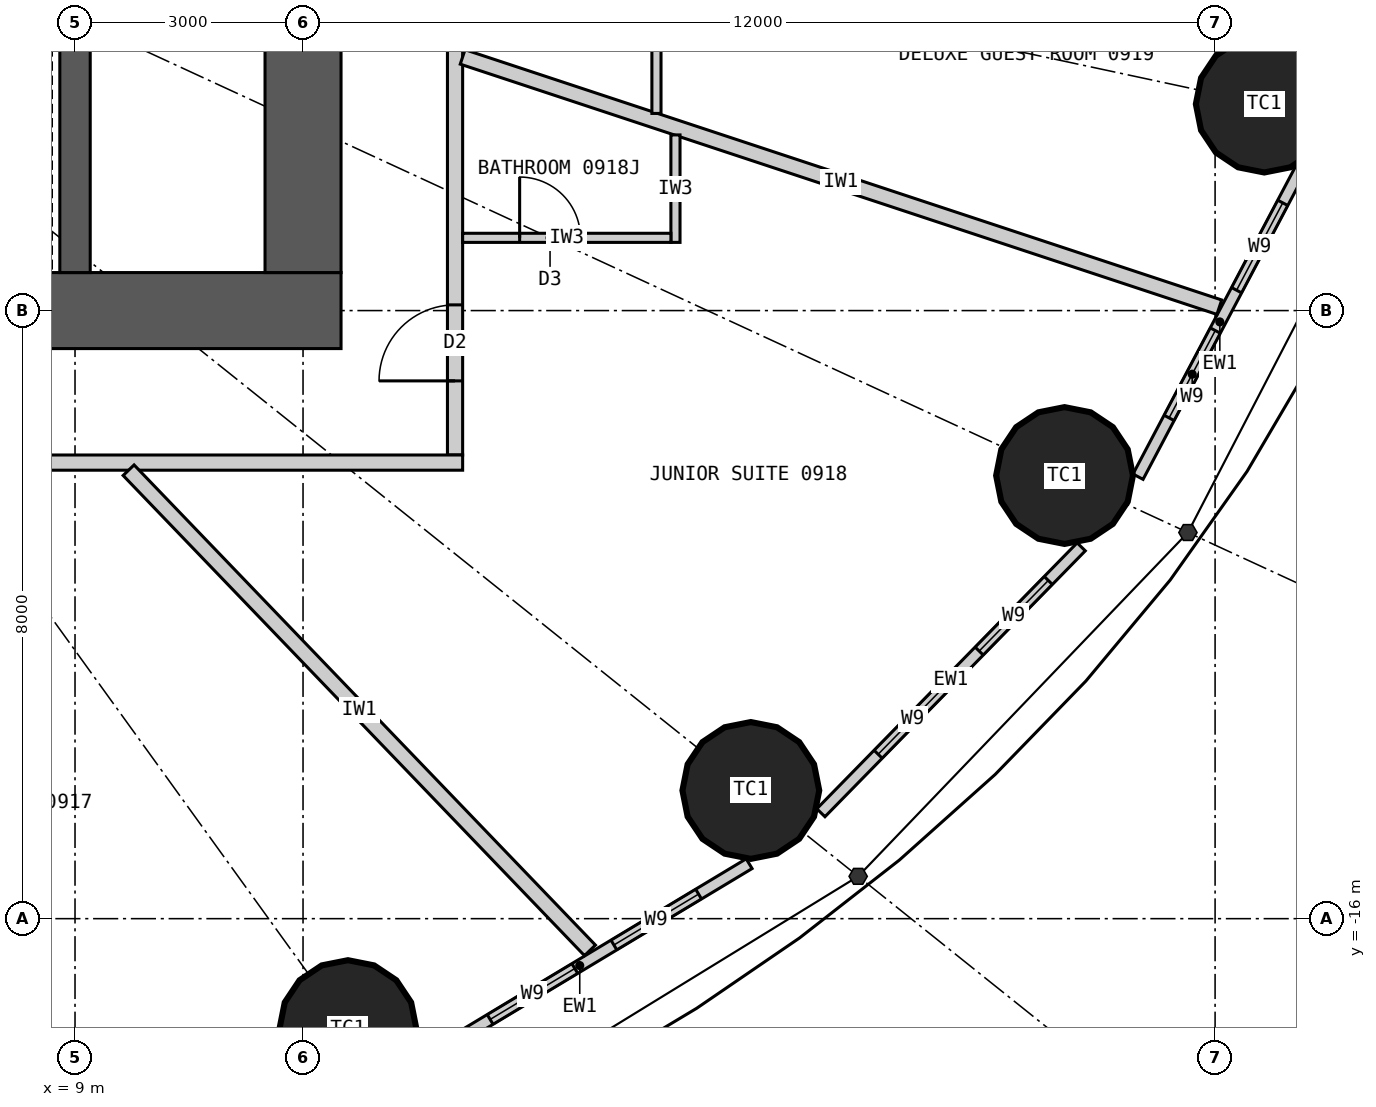
"""IFC4 building model, lengths in metres.
Left out: names, types, materials, properties, quantities, classifications, styles, units other than length and angle.
Written with IfcOpenShell. Run it as: python <this file> out.ifc"""

import sys

from ifc_helpers import new_model, si_unit, direction, frame, frame_2d, origin, origin_2d, place, context, subcontext, project, spatial, rectangle, circle, extrude, element, fill, save


model = new_model("IFC4")
c1 = context("Model", 3, precision=1e-05, world=origin(), true_north=direction((0.0, 1.0)))
c2 = subcontext(c1, "Body", "Model", "MODEL_VIEW")
j1 = project(units=[si_unit("LENGTHUNIT", "METRE"), si_unit("PLANEANGLEUNIT", "RADIAN")], contexts=[c1])
p1 = place(None, origin())
s1 = spatial("IfcSite", under=j1, at=p1, CompositionType="ELEMENT")
p2 = place(p1, origin())
s2 = spatial("IfcBuilding", under=s1, at=p2, CompositionType="ELEMENT")
p3 = place(p2, frame((0.0, 0.0, 42.6)))
s3 = spatial("IfcBuildingStorey", under=s2, at=p3, CompositionType="ELEMENT", Elevation=42.6)
for number, where, z_axis, x_axis in (
    (1, (12.591, -17.447, 0.0), (0.0, 0.0, 1.0), (1.0, 0.0, 0.0)),
    (2, (17.892, -14.313, 0.0), (0.0, 0.0, 1.0), (1.0, 0.0, 0.0)),
    (3, (22.019, -10.17, 0.0), (0.0, 0.0, 1.0), (1.0, 0.0, 0.0)),
    (4, (24.647, -5.283, 0.0), (0.0, 0.0, 1.0), (1.0, 0.0, 0.0)),
):
    element("IfcColumn", number, at=place(p3, frame(where, z_axis=z_axis, x_axis=x_axis)), inside=s3, PredefinedType="COLUMN", context=c2, shape_type="SweptSolid", body=[
        extrude(circle(Radius=0.9, at=origin_2d()), origin(), (0.0, 0.0, 1.0), 3.3),
    ])
p4 = place(p3, frame((12.5, -8.0, 0.0), z_axis=(0.0, 0.0, 1.0), x_axis=(-1.0, 0.0, 0.0)))
e5 = element("IfcWall", 5, at=p4, inside=s3, PredefinedType="SHEAR", context=c2, shape_type="SweptSolid", body=[
    extrude(rectangle(XDim=25.0, YDim=1.0, at=frame_2d((12.5, 0.0))), origin(), (0.0, 0.0, 1.0), 3.3),
])
p5 = place(p4, frame((11.2, 0.0, 0.0)))
e6 = element("IfcOpeningElement", 6, at=p5, cuts=e5, PredefinedType="OPENING", context=c2, shape_type="SweptSolid", body=[
    extrude(rectangle(XDim=1.2, YDim=2.2, at=frame_2d((0.6, 1.1))), frame((0.0, 0.51, 0.0), z_axis=(0.0, -1.0, 0.0), x_axis=(1.0, 0.0, 0.0)), (0.0, 0.0, 1.0), 1.02),
])
p6 = place(p4, frame((18.8, 0.0, 0.0)))
e7 = element("IfcOpeningElement", 7, at=p6, cuts=e5, PredefinedType="OPENING", context=c2, shape_type="SweptSolid", body=[
    extrude(rectangle(XDim=0.9, YDim=2.2, at=frame_2d((0.45, 1.1))), frame((0.0, 0.51, 0.0), z_axis=(0.0, -1.0, 0.0), x_axis=(1.0, 0.0, 0.0)), (0.0, 0.0, 1.0), 1.02),
])
p7 = place(p3, frame((12.0, -7.5, 0.0), z_axis=(0.0, 0.0, 1.0), x_axis=(0.0, 1.0, 0.0)))
e8 = element("IfcWall", 8, at=p7, inside=s3, PredefinedType="SHEAR", context=c2, shape_type="SweptSolid", body=[
    extrude(rectangle(XDim=15.0, YDim=1.0, at=frame_2d((7.5, 0.0))), origin(), (0.0, 0.0, 1.0), 3.3),
])
p8 = place(p7, frame((6.6, 0.0, 0.0)))
e9 = element("IfcOpeningElement", 9, at=p8, cuts=e8, PredefinedType="OPENING", context=c2, shape_type="SweptSolid", body=[
    extrude(rectangle(XDim=1.8, YDim=2.2, at=frame_2d((0.9, 1.1))), frame((0.0, 0.51, 0.0), z_axis=(0.0, -1.0, 0.0), x_axis=(1.0, 0.0, 0.0)), (0.0, 0.0, 1.0), 1.02),
])
p9 = place(p3, frame((9.0, -7.5, 0.0), z_axis=(0.0, 0.0, 1.0), x_axis=(0.0, 1.0, 0.0)))
e10 = element("IfcWall", 10, at=p9, inside=s3, PredefinedType="SHEAR", context=c2, shape_type="SweptSolid", body=[
    extrude(rectangle(XDim=3.0, YDim=0.4, at=frame_2d((1.5, 0.0))), origin(), (0.0, 0.0, 1.0), 3.3),
])
p10 = place(p3, frame((13.412, -17.957, 0.0), z_axis=(0.0, 0.0, 1.0), x_axis=(0.856958191554, 0.515385931054, 0.0)))
e11 = element("IfcWall", 11, at=p10, inside=s3, PredefinedType="ELEMENTEDWALL", context=c2, shape_type="SweptSolid", body=[
    extrude(rectangle(XDim=5.201, YDim=0.15, at=frame_2d((2.601, 0.0))), origin(), (0.0, 0.0, 1.0), 3.05),
])
p11 = place(p10, frame((1.225, 0.0, 0.9)))
e12 = element("IfcOpeningElement", 12, at=p11, cuts=e11, PredefinedType="OPENING", context=c2, shape_type="SweptSolid", body=[
    extrude(rectangle(XDim=1.3, YDim=1.9, at=frame_2d((0.65, 0.95))), frame((0.0, 0.085, 0.0), z_axis=(0.0, -1.0, 0.0), x_axis=(1.0, 0.0, 0.0)), (0.0, 0.0, 1.0), 0.17),
])
p12 = place(p10, frame((3.125, 0.0, 0.9)))
e13 = element("IfcOpeningElement", 13, at=p12, cuts=e11, PredefinedType="OPENING", context=c2, shape_type="SweptSolid", body=[
    extrude(rectangle(XDim=1.3, YDim=1.9, at=frame_2d((0.65, 0.95))), frame((0.0, 0.085, 0.0), z_axis=(0.0, -1.0, 0.0), x_axis=(1.0, 0.0, 0.0)), (0.0, 0.0, 1.0), 0.17),
])
p13 = place(p3, frame((18.813, -14.607, 0.0), z_axis=(0.0, 0.0, 1.0), x_axis=(0.699612594083, 0.714522370679, 0.0)))
e14 = element("IfcWall", 14, at=p13, inside=s3, PredefinedType="ELEMENTEDWALL", context=c2, shape_type="SweptSolid", body=[
    extrude(rectangle(XDim=4.896, YDim=0.15, at=frame_2d((2.448, 0.0))), origin(), (0.0, 0.0, 1.0), 3.05),
])
p14 = place(p13, frame((1.077, 0.0, 0.9)))
e15 = element("IfcOpeningElement", 15, at=p14, cuts=e14, PredefinedType="OPENING", context=c2, shape_type="SweptSolid", body=[
    extrude(rectangle(XDim=1.3, YDim=1.9, at=frame_2d((0.65, 0.95))), frame((0.0, 0.085, 0.0), z_axis=(0.0, -1.0, 0.0), x_axis=(1.0, 0.0, 0.0)), (0.0, 0.0, 1.0), 0.17),
])
p15 = place(p13, frame((2.977, 0.0, 0.9)))
e16 = element("IfcOpeningElement", 16, at=p15, cuts=e14, PredefinedType="OPENING", context=c2, shape_type="SweptSolid", body=[
    extrude(rectangle(XDim=1.3, YDim=1.9, at=frame_2d((0.65, 0.95))), frame((0.0, 0.085, 0.0), z_axis=(0.0, -1.0, 0.0), x_axis=(1.0, 0.0, 0.0)), (0.0, 0.0, 1.0), 0.17),
])
p16 = place(p3, frame((22.986, -10.185, 0.0), z_axis=(0.0, 0.0, 1.0), x_axis=(0.467303182954, 0.884097129959, 0.0)))
e17 = element("IfcWall", 17, at=p16, inside=s3, PredefinedType="ELEMENTEDWALL", context=c2, shape_type="SweptSolid", body=[
    extrude(rectangle(XDim=4.606, YDim=0.15, at=frame_2d((2.303, 0.0))), origin(), (0.0, 0.0, 1.0), 3.05),
])
p17 = place(p16, frame((0.875, 0.0, 0.9)))
e18 = element("IfcOpeningElement", 18, at=p17, cuts=e17, PredefinedType="OPENING", context=c2, shape_type="SweptSolid", body=[
    extrude(rectangle(XDim=1.3, YDim=1.9, at=frame_2d((0.65, 0.95))), frame((0.0, 0.085, 0.0), z_axis=(0.0, -1.0, 0.0), x_axis=(1.0, 0.0, 0.0)), (0.0, 0.0, 1.0), 0.17),
])
p18 = place(p16, frame((2.775, 0.0, 0.9)))
e19 = element("IfcOpeningElement", 19, at=p18, cuts=e17, PredefinedType="OPENING", context=c2, shape_type="SweptSolid", body=[
    extrude(rectangle(XDim=1.3, YDim=1.9, at=frame_2d((0.65, 0.95))), frame((0.0, 0.085, 0.0), z_axis=(0.0, -1.0, 0.0), x_axis=(1.0, 0.0, 0.0)), (0.0, 0.0, 1.0), 0.17),
])
p19 = place(p3, frame((14.0, -9.9, 0.0), z_axis=(0.0, 0.0, 1.0), x_axis=(0.0, 1.0, 0.0)))
e20 = element("IfcWall", 20, at=p19, inside=s3, PredefinedType="PARTITIONING", context=c2, shape_type="SweptSolid", body=[
    extrude(rectangle(XDim=19.8, YDim=0.2, at=frame_2d((9.9, 0.0))), origin(), (0.0, 0.0, 1.0), 3.05),
])
p20 = place(p19, frame((11.698, 0.0, 0.0)))
e21 = element("IfcOpeningElement", 21, at=p20, cuts=e20, PredefinedType="OPENING", context=c2, shape_type="SweptSolid", body=[
    extrude(rectangle(XDim=1.0, YDim=2.2, at=frame_2d((0.5, 1.1))), frame((0.0, 0.11, 0.0), z_axis=(0.0, -1.0, 0.0), x_axis=(1.0, 0.0, 0.0)), (0.0, 0.0, 1.0), 0.22),
])
p21 = place(p19, frame((13.554, 0.0, 0.0)))
e22 = element("IfcOpeningElement", 22, at=p21, cuts=e20, PredefinedType="OPENING", context=c2, shape_type="SweptSolid", body=[
    extrude(rectangle(XDim=1.0, YDim=2.0, at=frame_2d((0.5, 1.0))), frame((0.0, 0.11, 0.0), z_axis=(0.0, -1.0, 0.0), x_axis=(1.0, 0.0, 0.0)), (0.0, 0.0, 1.0), 0.22),
])
p22 = place(p19, frame((18.698, 0.0, 0.0)))
e23 = element("IfcOpeningElement", 23, at=p22, cuts=e20, PredefinedType="OPENING", context=c2, shape_type="SweptSolid", body=[
    extrude(rectangle(XDim=1.0, YDim=2.2, at=frame_2d((0.5, 1.1))), frame((0.0, 0.11, 0.0), z_axis=(0.0, -1.0, 0.0), x_axis=(1.0, 0.0, 0.0)), (0.0, 0.0, 1.0), 0.22),
])
p23 = place(p19, frame((0.975, 0.0, 0.0)))
e24 = element("IfcOpeningElement", 24, at=p23, cuts=e20, PredefinedType="OPENING", context=c2, shape_type="SweptSolid", body=[
    extrude(rectangle(XDim=1.0, YDim=2.2, at=frame_2d((0.5, 1.1))), frame((0.0, 0.11, 0.0), z_axis=(0.0, -1.0, 0.0), x_axis=(1.0, 0.0, 0.0)), (0.0, 0.0, 1.0), 0.22),
])
p24 = place(p19, frame((7.097, 0.0, 0.0)))
e25 = element("IfcOpeningElement", 25, at=p24, cuts=e20, PredefinedType="OPENING", context=c2, shape_type="SweptSolid", body=[
    extrude(rectangle(XDim=1.0, YDim=2.2, at=frame_2d((0.5, 1.1))), frame((0.0, 0.11, 0.0), z_axis=(0.0, -1.0, 0.0), x_axis=(1.0, 0.0, 0.0)), (0.0, 0.0, 1.0), 0.22),
])
p25 = place(p3, frame((14.1, -10.0, 0.0), z_axis=(0.0, 0.0, 1.0), x_axis=(-1.0, 0.0, 0.0)))
e26 = element("IfcWall", 26, at=p25, inside=s3, PredefinedType="PARTITIONING", context=c2, shape_type="SweptSolid", body=[
    extrude(rectangle(XDim=28.2, YDim=0.2, at=frame_2d((14.1, 0.0))), origin(), (0.0, 0.0, 1.0), 3.05),
])
p26 = place(p25, frame((21.948, 0.0, 0.0)))
e27 = element("IfcOpeningElement", 27, at=p26, cuts=e26, PredefinedType="OPENING", context=c2, shape_type="SweptSolid", body=[
    extrude(rectangle(XDim=1.0, YDim=2.2, at=frame_2d((0.5, 1.1))), frame((0.0, 0.11, 0.0), z_axis=(0.0, -1.0, 0.0), x_axis=(1.0, 0.0, 0.0)), (0.0, 0.0, 1.0), 0.22),
])
p27 = place(p25, frame((15.684, 0.0, 0.0)))
e28 = element("IfcOpeningElement", 28, at=p27, cuts=e26, PredefinedType="OPENING", context=c2, shape_type="SweptSolid", body=[
    extrude(rectangle(XDim=1.0, YDim=2.2, at=frame_2d((0.5, 1.1))), frame((0.0, 0.11, 0.0), z_axis=(0.0, -1.0, 0.0), x_axis=(1.0, 0.0, 0.0)), (0.0, 0.0, 1.0), 0.22),
])
p28 = place(p25, frame((8.875, 0.0, 0.0)))
e29 = element("IfcOpeningElement", 29, at=p28, cuts=e26, PredefinedType="OPENING", context=c2, shape_type="SweptSolid", body=[
    extrude(rectangle(XDim=1.0, YDim=2.2, at=frame_2d((0.5, 1.1))), frame((0.0, 0.11, 0.0), z_axis=(0.0, -1.0, 0.0), x_axis=(1.0, 0.0, 0.0)), (0.0, 0.0, 1.0), 0.22),
])
p29 = place(p3, frame((9.705, -10.1, 0.0), z_axis=(0.0, 0.0, 1.0), x_axis=(0.692879226267, -0.721053658064, 0.0)))
e30 = element("IfcWall", 30, at=p29, inside=s3, PredefinedType="PARTITIONING", context=c2, shape_type="SweptSolid", body=[
    extrude(rectangle(XDim=8.761, YDim=0.2, at=frame_2d((4.38, 0.0))), origin(), (0.0, 0.0, 1.0), 3.05),
])
p30 = place(p3, frame((14.1, -4.663, 0.0), z_axis=(0.0, 0.0, 1.0), x_axis=(0.949432655039, -0.31397075269, 0.0)))
e31 = element("IfcWall", 31, at=p30, inside=s3, PredefinedType="PARTITIONING", context=c2, shape_type="SweptSolid", body=[
    extrude(rectangle(XDim=10.486, YDim=0.2, at=frame_2d((5.243, 0.0))), origin(), (0.0, 0.0, 1.0), 3.05),
])
p31 = place(p3, frame((16.9, -5.689, 0.0), z_axis=(0.0, 0.0, 1.0), x_axis=(0.0, -1.0, 0.0)))
e32 = element("IfcWall", 32, at=p31, inside=s3, PredefinedType="PARTITIONING", context=c2, shape_type="SweptSolid", body=[
    extrude(rectangle(XDim=1.414, YDim=0.12, at=frame_2d((0.707, 0.0))), origin(), (0.0, 0.0, 1.0), 3.05),
])
p32 = place(p3, frame((14.1, -7.043, 0.0), z_axis=(0.0, 0.0, 1.0), x_axis=(1.0, 0.0, 0.0)))
e33 = element("IfcWall", 33, at=p32, inside=s3, PredefinedType="PARTITIONING", context=c2, shape_type="SweptSolid", body=[
    extrude(rectangle(XDim=2.74, YDim=0.12, at=frame_2d((1.37, 0.0))), origin(), (0.0, 0.0, 1.0), 3.05),
])
p33 = place(p32, frame((0.75, 0.0, 0.0)))
e34 = element("IfcOpeningElement", 34, at=p33, cuts=e33, PredefinedType="OPENING", context=c2, shape_type="SweptSolid", body=[
    extrude(rectangle(XDim=0.8, YDim=2.1, at=frame_2d((0.4, 1.05))), frame((0.0, 0.07, 0.0), z_axis=(0.0, -1.0, 0.0), x_axis=(1.0, 0.0, 0.0)), (0.0, 0.0, 1.0), 0.14),
])
p34 = place(p3, frame((16.65, -5.406, 0.0), z_axis=(0.0, 0.0, 1.0), x_axis=(0.0, 1.0, 0.0)))
e35 = element("IfcWall", 35, at=p34, inside=s3, PredefinedType="PARTITIONING", context=c2, shape_type="SweptSolid", body=[
    extrude(rectangle(XDim=2.483, YDim=0.12, at=frame_2d((1.242, 0.0))), origin(), (0.0, 0.0, 1.0), 3.05),
])
p35 = place(p11, origin())
e36 = element("IfcWindow", 36, at=p35, inside=s3, PartitioningType="SINGLE_PANEL", PredefinedType="WINDOW", context=c2, shape_type="SweptSolid", body=[
    extrude(rectangle(XDim=1.3, YDim=1.9, at=frame_2d((0.65, 0.95))), frame((0.0, 0.03, 0.0), z_axis=(0.0, -1.0, 0.0), x_axis=(1.0, 0.0, 0.0)), (0.0, 0.0, 1.0), 0.06),
])
fill(e12, e36)
p36 = place(p12, origin())
e37 = element("IfcWindow", 37, at=p36, inside=s3, PartitioningType="SINGLE_PANEL", PredefinedType="WINDOW", context=c2, shape_type="SweptSolid", body=[
    extrude(rectangle(XDim=1.3, YDim=1.9, at=frame_2d((0.65, 0.95))), frame((0.0, 0.03, 0.0), z_axis=(0.0, -1.0, 0.0), x_axis=(1.0, 0.0, 0.0)), (0.0, 0.0, 1.0), 0.06),
])
fill(e13, e37)
p37 = place(p14, origin())
e38 = element("IfcWindow", 38, at=p37, inside=s3, PartitioningType="SINGLE_PANEL", PredefinedType="WINDOW", context=c2, shape_type="SweptSolid", body=[
    extrude(rectangle(XDim=1.3, YDim=1.9, at=frame_2d((0.65, 0.95))), frame((0.0, 0.03, 0.0), z_axis=(0.0, -1.0, 0.0), x_axis=(1.0, 0.0, 0.0)), (0.0, 0.0, 1.0), 0.06),
])
fill(e15, e38)
p38 = place(p15, origin())
e39 = element("IfcWindow", 39, at=p38, inside=s3, PartitioningType="SINGLE_PANEL", PredefinedType="WINDOW", context=c2, shape_type="SweptSolid", body=[
    extrude(rectangle(XDim=1.3, YDim=1.9, at=frame_2d((0.65, 0.95))), frame((0.0, 0.03, 0.0), z_axis=(0.0, -1.0, 0.0), x_axis=(1.0, 0.0, 0.0)), (0.0, 0.0, 1.0), 0.06),
])
fill(e16, e39)
p39 = place(p17, origin())
e40 = element("IfcWindow", 40, at=p39, inside=s3, PartitioningType="SINGLE_PANEL", PredefinedType="WINDOW", context=c2, shape_type="SweptSolid", body=[
    extrude(rectangle(XDim=1.3, YDim=1.9, at=frame_2d((0.65, 0.95))), frame((0.0, 0.03, 0.0), z_axis=(0.0, -1.0, 0.0), x_axis=(1.0, 0.0, 0.0)), (0.0, 0.0, 1.0), 0.06),
])
fill(e18, e40)
p40 = place(p18, origin())
e41 = element("IfcWindow", 41, at=p40, inside=s3, PartitioningType="SINGLE_PANEL", PredefinedType="WINDOW", context=c2, shape_type="SweptSolid", body=[
    extrude(rectangle(XDim=1.3, YDim=1.9, at=frame_2d((0.65, 0.95))), frame((0.0, 0.03, 0.0), z_axis=(0.0, -1.0, 0.0), x_axis=(1.0, 0.0, 0.0)), (0.0, 0.0, 1.0), 0.06),
])
fill(e19, e41)
p41 = place(p33, origin())
e42 = element("IfcDoor", 42, at=p41, inside=s3, OperationType="SINGLE_SWING_LEFT", PredefinedType="DOOR", context=c2, shape_type="SweptSolid", body=[
    extrude(rectangle(XDim=0.8, YDim=2.1, at=frame_2d((0.4, 1.05))), frame((0.0, 0.025, 0.0), z_axis=(0.0, -1.0, 0.0), x_axis=(1.0, 0.0, 0.0)), (0.0, 0.0, 1.0), 0.05),
])
fill(e34, e42)
p42 = place(p23, origin())
e43 = element("IfcDoor", 43, at=p42, inside=s3, OperationType="SINGLE_SWING_LEFT", PredefinedType="DOOR", context=c2, shape_type="SweptSolid", body=[
    extrude(rectangle(XDim=1.0, YDim=2.2, at=frame_2d((0.5, 1.1))), frame((0.0, 0.025, 0.0), z_axis=(0.0, -1.0, 0.0), x_axis=(1.0, 0.0, 0.0)), (0.0, 0.0, 1.0), 0.05),
])
fill(e24, e43)
save(model, sys.argv[1])
